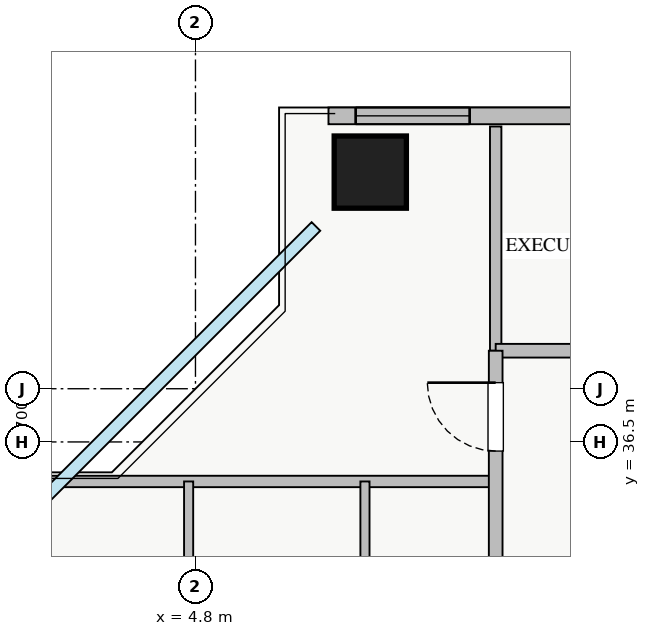
"""IFC4 building model, lengths in metres.
Left out: names, types, materials, properties, quantities, classifications, styles, units other than length and angle.
Written with IfcOpenShell. Run it as: python <this file> out.ifc"""

import sys

from ifc_helpers import new_model, si_unit, direction, frame, frame_2d, origin, origin_2d, place, context, subcontext, project, spatial, rectangle, extrude, source, transform, mapped, element, fill, save


model = new_model("IFC4")
c1 = context("Model", 3, precision=1e-05, world=origin(), true_north=direction((0.0, 1.0)))
c2 = subcontext(c1, "Body", "Model", "MODEL_VIEW")
j1 = project(units=[si_unit("LENGTHUNIT", "METRE"), si_unit("PLANEANGLEUNIT", "RADIAN")], contexts=[c1])
p1 = place(None, origin())
s1 = spatial("IfcSite", under=j1, at=p1, CompositionType="ELEMENT")
p2 = place(p1, origin())
s2 = spatial("IfcBuilding", under=s1, at=p2, CompositionType="ELEMENT")
p3 = place(p2, frame((0.0, 0.0, 147.0)))
s3 = spatial("IfcBuildingStorey", under=s2, at=p3, CompositionType="ELEMENT", Elevation=147.0)
m1 = source(origin(), c2, "Body", "SweptSolid", [
    extrude(rectangle(XDim=0.95, YDim=0.95, at=origin_2d()), origin(), (0.0, 0.0, 1.0), 3.25),
])
p4 = place(p3, frame((7.1, 40.05, 0.0), z_axis=(0.0, 0.0, 1.0), x_axis=(1.0, 0.0, 0.0)))
e1 = element("IfcColumn", 1, at=p4, inside=s3, PredefinedType="COLUMN", context=c2, shape_type="MappedRepresentation", body=[
    mapped(m1, transform((0.0, 0.0, 0.0), x_axis=(1.0, 0.0, 0.0), y_axis=(0.0, 1.0, 0.0), z_axis=(0.0, 0.0, 1.0), scale=1.0)),
])
p5 = place(p3, frame((6.55, 40.79, 0.0), z_axis=(0.0, 0.0, 1.0), x_axis=(1.0, 0.0, 0.0)))
e2 = element("IfcWall", 2, at=p5, inside=s3, PredefinedType="STANDARD", context=c2, shape_type="SweptSolid", body=[
    extrude(rectangle(XDim=24.9, YDim=0.22, at=frame_2d((12.45, 0.0))), origin(), (0.0, 0.0, 1.0), 2.61),
])
p6 = place(p5, frame((13.3, 0.0, 0.0)))
e3 = element("IfcOpeningElement", 3, at=p6, cuts=e2, PredefinedType="OPENING", context=c2, shape_type="SweptSolid", body=[
    extrude(rectangle(XDim=1.2, YDim=2.1, at=frame_2d((0.6, 1.05))), frame((0.0, 0.12, 0.0), z_axis=(0.0, -1.0, 0.0), x_axis=(1.0, 0.0, 0.0)), (0.0, 0.0, 1.0), 0.24),
])
p7 = place(p5, frame((0.357, 0.0, 0.9)))
e4 = element("IfcOpeningElement", 4, at=p7, cuts=e2, PredefinedType="OPENING", context=c2, shape_type="SweptSolid", body=[
    extrude(rectangle(XDim=1.5, YDim=1.5, at=frame_2d((0.75, 0.75))), frame((0.0, 0.12, 0.0), z_axis=(0.0, -1.0, 0.0), x_axis=(1.0, 0.0, 0.0)), (0.0, 0.0, 1.0), 0.24),
])
p8 = place(p5, frame((9.77, 0.0, 0.9)))
e5 = element("IfcOpeningElement", 5, at=p8, cuts=e2, PredefinedType="OPENING", context=c2, shape_type="SweptSolid", body=[
    extrude(rectangle(XDim=1.8, YDim=1.5, at=frame_2d((0.9, 0.75))), frame((0.0, 0.12, 0.0), z_axis=(0.0, -1.0, 0.0), x_axis=(1.0, 0.0, 0.0)), (0.0, 0.0, 1.0), 0.24),
])
p9 = place(p5, frame((14.813, 0.0, 0.9)))
e6 = element("IfcOpeningElement", 6, at=p9, cuts=e2, PredefinedType="OPENING", context=c2, shape_type="SweptSolid", body=[
    extrude(rectangle(XDim=1.5, YDim=1.45, at=frame_2d((0.75, 0.725))), frame((0.0, 0.12, 0.0), z_axis=(0.0, -1.0, 0.0), x_axis=(1.0, 0.0, 0.0)), (0.0, 0.0, 1.0), 0.24),
])
p10 = place(p5, frame((20.738, 0.0, 0.9)))
e7 = element("IfcOpeningElement", 7, at=p10, cuts=e2, PredefinedType="OPENING", context=c2, shape_type="SweptSolid", body=[
    extrude(rectangle(XDim=2.1, YDim=1.48, at=frame_2d((1.05, 0.74))), frame((0.0, 0.12, 0.0), z_axis=(0.0, -1.0, 0.0), x_axis=(1.0, 0.0, 0.0)), (0.0, 0.0, 1.0), 0.24),
])
p11 = place(p5, frame((4.136, 0.0, 0.9)))
e8 = element("IfcOpeningElement", 8, at=p11, cuts=e2, PredefinedType="OPENING", context=c2, shape_type="SweptSolid", body=[
    extrude(rectangle(XDim=2.4, YDim=1.5, at=frame_2d((1.2, 0.75))), frame((0.0, 0.12, 0.0), z_axis=(0.0, -1.0, 0.0), x_axis=(1.0, 0.0, 0.0)), (0.0, 0.0, 1.0), 0.24),
])
p12 = place(p3, frame((8.75, 37.7, 0.0), z_axis=(0.0, 0.0, 1.0), x_axis=(0.0, 1.0, 0.0)))
e9 = element("IfcWall", 9, at=p12, inside=s3, PredefinedType="PARTITIONING", context=c2, shape_type="SweptSolid", body=[
    extrude(rectangle(XDim=2.95, YDim=0.15, at=frame_2d((1.475, 0.0))), origin(), (0.0, 0.0, 1.0), 3.07),
])
p13 = place(p3, frame((8.75, 37.7, 0.0), z_axis=(0.0, 0.0, 1.0), x_axis=(1.0, 0.0, 0.0)))
e10 = element("IfcWall", 10, at=p13, inside=s3, PredefinedType="PARTITIONING", context=c2, shape_type="SweptSolid", body=[
    extrude(rectangle(XDim=23.61, YDim=0.18, at=frame_2d((11.805, 0.0))), origin(), (0.0, 0.0, 1.0), 3.07),
])
p14 = place(p13, frame((2.795, 0.0, 0.0)))
e11 = element("IfcOpeningElement", 11, at=p14, cuts=e10, PredefinedType="OPENING", context=c2, shape_type="SweptSolid", body=[
    extrude(rectangle(XDim=1.0, YDim=2.05, at=frame_2d((0.5, 1.025))), frame((0.0, 0.1, 0.0), z_axis=(0.0, -1.0, 0.0), x_axis=(1.0, 0.0, 0.0)), (0.0, 0.0, 1.0), 0.2),
])
p15 = place(p13, frame((7.97, 0.0, 0.0)))
e12 = element("IfcOpeningElement", 12, at=p15, cuts=e10, PredefinedType="OPENING", context=c2, shape_type="SweptSolid", body=[
    extrude(rectangle(XDim=1.0, YDim=2.05, at=frame_2d((0.5, 1.025))), frame((0.0, 0.1, 0.0), z_axis=(0.0, -1.0, 0.0), x_axis=(1.0, 0.0, 0.0)), (0.0, 0.0, 1.0), 0.2),
])
p16 = place(p13, frame((13.385, 0.0, 0.0)))
e13 = element("IfcOpeningElement", 13, at=p16, cuts=e10, PredefinedType="OPENING", context=c2, shape_type="SweptSolid", body=[
    extrude(rectangle(XDim=1.0, YDim=2.05, at=frame_2d((0.5, 1.025))), frame((0.0, 0.1, 0.0), z_axis=(0.0, -1.0, 0.0), x_axis=(1.0, 0.0, 0.0)), (0.0, 0.0, 1.0), 0.2),
])
p17 = place(p13, frame((19.825, 0.0, 0.0)))
e14 = element("IfcOpeningElement", 14, at=p17, cuts=e10, PredefinedType="OPENING", context=c2, shape_type="SweptSolid", body=[
    extrude(rectangle(XDim=1.0, YDim=2.05, at=frame_2d((0.5, 1.025))), frame((0.0, 0.1, 0.0), z_axis=(0.0, -1.0, 0.0), x_axis=(1.0, 0.0, 0.0)), (0.0, 0.0, 1.0), 0.2),
])
p18 = place(p3, frame((1.35, 35.98, 0.0), z_axis=(0.0, 0.0, 1.0), x_axis=(1.0, 0.0, 0.0)))
e15 = element("IfcWall", 15, at=p18, inside=s3, PredefinedType="PARTITIONING", context=c2, shape_type="SweptSolid", body=[
    extrude(rectangle(XDim=7.4, YDim=0.15, at=frame_2d((3.7, 0.0))), origin(), (0.0, 0.0, 1.0), 3.07),
])
p19 = place(p3, frame((4.71, 31.42, 0.0), z_axis=(0.0, 0.0, 1.0), x_axis=(0.0, 1.0, 0.0)))
e16 = element("IfcWall", 16, at=p19, inside=s3, PredefinedType="PLUMBINGWALL", context=c2, shape_type="SweptSolid", body=[
    extrude(rectangle(XDim=4.56, YDim=0.12, at=frame_2d((2.28, 0.0))), origin(), (0.0, 0.0, 1.0), 3.07),
])
p20 = place(p3, frame((7.03, 31.42, 0.0), z_axis=(0.0, 0.0, 1.0), x_axis=(0.0, 1.0, 0.0)))
e17 = element("IfcWall", 17, at=p20, inside=s3, PredefinedType="PLUMBINGWALL", context=c2, shape_type="SweptSolid", body=[
    extrude(rectangle(XDim=4.56, YDim=0.12, at=frame_2d((2.28, 0.0))), origin(), (0.0, 0.0, 1.0), 2.577),
])
p21 = place(p3, frame((8.75, 8.3, 0.0), z_axis=(0.0, 0.0, 1.0), x_axis=(0.0, 1.0, 0.0)))
e18 = element("IfcWall", 18, at=p21, inside=s3, PredefinedType="PARTITIONING", context=c2, shape_type="SweptSolid", body=[
    extrude(rectangle(XDim=29.4, YDim=0.18, at=frame_2d((14.7, 0.0))), origin(), (0.0, 0.0, 1.0), 3.07),
])
p22 = place(p21, frame((28.08, 0.0, 0.0)))
e19 = element("IfcOpeningElement", 19, at=p22, cuts=e18, PredefinedType="OPENING", context=c2, shape_type="SweptSolid", body=[
    extrude(rectangle(XDim=0.9, YDim=2.05, at=frame_2d((0.45, 1.025))), frame((0.0, 0.1, 0.0), z_axis=(0.0, -1.0, 0.0), x_axis=(1.0, 0.0, 0.0)), (0.0, 0.0, 1.0), 0.2),
])
p23 = place(p21, frame((0.245, 0.0, 0.0)))
e20 = element("IfcOpeningElement", 20, at=p23, cuts=e18, PredefinedType="OPENING", context=c2, shape_type="SweptSolid", body=[
    extrude(rectangle(XDim=0.9, YDim=2.05, at=frame_2d((0.45, 1.025))), frame((0.0, 0.1, 0.0), z_axis=(0.0, -1.0, 0.0), x_axis=(1.0, 0.0, 0.0)), (0.0, 0.0, 1.0), 0.2),
])
p24 = place(p21, frame((5.0, 0.0, 0.0)))
e21 = element("IfcOpeningElement", 21, at=p24, cuts=e18, PredefinedType="OPENING", context=c2, shape_type="SweptSolid", body=[
    extrude(rectangle(XDim=1.0, YDim=2.05, at=frame_2d((0.5, 1.025))), frame((0.0, 0.1, 0.0), z_axis=(0.0, -1.0, 0.0), x_axis=(1.0, 0.0, 0.0)), (0.0, 0.0, 1.0), 0.2),
])
p25 = place(p21, frame((11.165, 0.0, 0.0)))
e22 = element("IfcOpeningElement", 22, at=p25, cuts=e18, PredefinedType="OPENING", context=c2, shape_type="SweptSolid", body=[
    extrude(rectangle(XDim=1.0, YDim=2.05, at=frame_2d((0.5, 1.025))), frame((0.0, 0.1, 0.0), z_axis=(0.0, -1.0, 0.0), x_axis=(1.0, 0.0, 0.0)), (0.0, 0.0, 1.0), 0.2),
])
p26 = place(p21, frame((20.325, 0.0, 0.0)))
e23 = element("IfcOpeningElement", 23, at=p26, cuts=e18, PredefinedType="OPENING", context=c2, shape_type="SweptSolid", body=[
    extrude(rectangle(XDim=1.0, YDim=2.05, at=frame_2d((0.5, 1.025))), frame((0.0, 0.1, 0.0), z_axis=(0.0, -1.0, 0.0), x_axis=(1.0, 0.0, 0.0)), (0.0, 0.0, 1.0), 0.2),
])
m2 = source(origin(), c2, "Body", "SweptSolid", [
    extrude(rectangle(XDim=1.5, YDim=1.5, at=frame_2d((0.75, 0.75))), frame((0.0, 0.03, 0.0), z_axis=(0.0, -1.0, 0.0), x_axis=(1.0, 0.0, 0.0)), (0.0, 0.0, 1.0), 0.06),
])
p27 = place(p7, origin())
e24 = element("IfcWindow", 24, at=p27, inside=s3, PartitioningType="TRIPLE_PANEL_VERTICAL", PredefinedType="WINDOW", context=c2, shape_type="MappedRepresentation", body=[
    mapped(m2, transform((0.0, 0.0, 0.0), x_axis=(1.0, 0.0, 0.0), y_axis=(0.0, 1.0, 0.0), z_axis=(0.0, 0.0, 1.0), scale=1.0)),
])
fill(e4, e24)
m3 = source(origin(), c2, "Body", "SweptSolid", [
    extrude(rectangle(XDim=0.9, YDim=2.05, at=frame_2d((0.45, 1.025))), frame((0.0, 0.025, 0.0), z_axis=(0.0, -1.0, 0.0), x_axis=(1.0, 0.0, 0.0)), (0.0, 0.0, 1.0), 0.05),
])
p28 = place(p22, origin())
e25 = element("IfcDoor", 25, at=p28, inside=s3, OperationType="SINGLE_SWING_RIGHT", PredefinedType="DOOR", context=c2, shape_type="MappedRepresentation", body=[
    mapped(m3, transform((0.0, 0.0, 0.0), x_axis=(1.0, 0.0, 0.0), y_axis=(0.0, 1.0, 0.0), z_axis=(0.0, 0.0, 1.0), scale=1.0)),
])
fill(e19, e25)
save(model, sys.argv[1])
